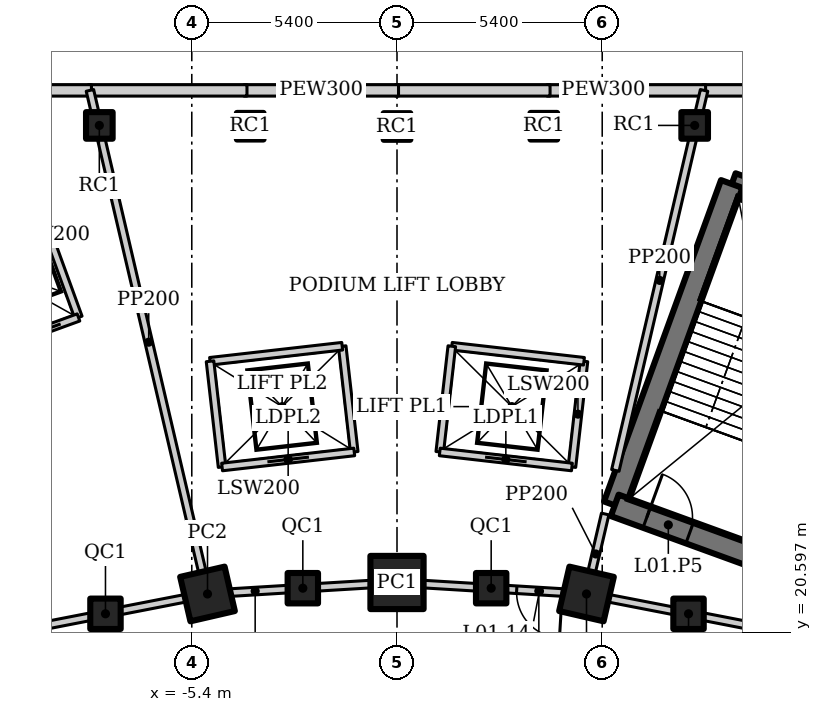
"""IFC4 building model, lengths in metres.
Left out: names, types, materials, properties, quantities, classifications, styles, units other than length and angle.
Written with IfcOpenShell. Run it as: python <this file> out.ifc"""

import sys

from ifc_helpers import new_model, si_unit, direction, frame, frame_2d, origin, origin_2d, place, context, subcontext, project, spatial, rectangle, hollow_rectangle, extrude, element, fill, save


model = new_model("IFC4")
c1 = context("Model", 3, precision=1e-05, world=origin(), true_north=direction((0.0, 1.0)))
c2 = subcontext(c1, "Body", "Model", "MODEL_VIEW")
j1 = project(units=[si_unit("LENGTHUNIT", "METRE"), si_unit("PLANEANGLEUNIT", "RADIAN")], contexts=[c1])
p1 = place(None, origin())
s1 = spatial("IfcSite", under=j1, at=p1, CompositionType="ELEMENT")
p2 = place(p1, origin())
s2 = spatial("IfcBuilding", under=s1, at=p2, CompositionType="ELEMENT")
p3 = place(p2, frame((0.0, 0.0, 6.5)))
s3 = spatial("IfcBuildingStorey", under=s2, at=p3, CompositionType="ELEMENT", Elevation=6.5)
p4 = place(p3, frame((4.986, 21.598, 0.0), z_axis=(0.0, 0.0, 1.0), x_axis=(0.224951054344, 0.974370064785, 0.0)))
e1 = element("IfcColumn", 1, at=p4, inside=s3, PredefinedType="COLUMN", context=c2, shape_type="SweptSolid", body=[
    extrude(hollow_rectangle(XDim=1.2, YDim=1.2, WallThickness=0.1, at=origin_2d()), origin(), (0.0, 0.0, 1.0), 8.0),
])
p5 = place(p3, frame((0.0, 21.9, 0.0), z_axis=(0.0, 0.0, 1.0), x_axis=(1.0, 0.0, 0.0)))
e2 = element("IfcColumn", 2, at=p5, inside=s3, PredefinedType="COLUMN", context=c2, shape_type="SweptSolid", body=[
    extrude(hollow_rectangle(XDim=1.4, YDim=1.4, WallThickness=0.1, at=origin_2d()), origin(), (0.0, 0.0, 1.0), 8.0),
])
p6 = place(p3, frame((-4.986, 21.598, 0.0), z_axis=(0.0, 0.0, 1.0), x_axis=(0.974370064785, 0.224951054344, 0.0)))
e3 = element("IfcColumn", 3, at=p6, inside=s3, PredefinedType="COLUMN", context=c2, shape_type="SweptSolid", body=[
    extrude(hollow_rectangle(XDim=1.2, YDim=1.2, WallThickness=0.1, at=origin_2d()), origin(), (0.0, 0.0, 1.0), 8.0),
])
for number, where, z_axis, x_axis in (
    (4, (7.671, 21.076, 0.0), (0.0, 0.0, 1.0), (1.0, 0.0, 0.0)),
    (5, (2.478, 21.75, 0.0), (0.0, 0.0, 1.0), (1.0, 0.0, 0.0)),
    (6, (-2.478, 21.75, 0.0), (0.0, 0.0, 1.0), (1.0, 0.0, 0.0)),
    (7, (-7.671, 21.076, 0.0), (0.0, 0.0, 1.0), (1.0, 0.0, 0.0)),
):
    element("IfcColumn", number, at=place(p3, frame(where, z_axis=z_axis, x_axis=x_axis)), inside=s3, PredefinedType="COLUMN", context=c2, shape_type="SweptSolid", body=[
        extrude(hollow_rectangle(XDim=0.8, YDim=0.8, WallThickness=0.05, at=origin_2d()), origin(), (0.0, 0.0, 1.0), 8.0),
    ])
for number, where, z_axis, x_axis in (
    (8, (3.863, 33.907, 0.0), (0.0, 0.0, 1.0), (1.0, 0.0, 0.0)),
    (9, (-3.863, 33.907, 0.0), (0.0, 0.0, 1.0), (1.0, 0.0, 0.0)),
    (10, (7.833, 33.928, 0.0), (0.0, 0.0, 1.0), (1.0, 0.0, 0.0)),
    (11, (0.0, 33.9, 0.0), (0.0, 0.0, 1.0), (1.0, 0.0, 0.0)),
    (12, (-7.833, 33.928, 0.0), (0.0, 0.0, 1.0), (1.0, 0.0, 0.0)),
):
    element("IfcColumn", number, at=place(p3, frame(where, z_axis=z_axis, x_axis=x_axis)), inside=s3, PredefinedType="COLUMN", context=c2, shape_type="SweptSolid", body=[
        extrude(hollow_rectangle(XDim=0.7, YDim=0.7, WallThickness=0.04, at=origin_2d()), origin(), (0.0, 0.0, 1.0), 8.0),
    ])
p7 = place(p3, frame((12.779, 34.85, 0.0), z_axis=(0.0, 0.0, 1.0), x_axis=(-1.0, 0.0, 0.0)))
e13 = element("IfcWall", 13, at=p7, inside=s3, PredefinedType="SOLIDWALL", context=c2, shape_type="SweptSolid", body=[
    extrude(rectangle(XDim=4.739, YDim=0.3, at=frame_2d((2.369, 0.0))), origin(), (0.0, 0.0, 1.0), 7.8),
])
p8 = place(p3, frame((8.12, 34.85, 0.0), z_axis=(0.0, 0.0, 1.0), x_axis=(-1.0, 0.0, 0.0)))
e14 = element("IfcWall", 14, at=p8, inside=s3, PredefinedType="SOLIDWALL", context=c2, shape_type="SweptSolid", body=[
    extrude(rectangle(XDim=4.173, YDim=0.3, at=frame_2d((2.086, 0.0))), origin(), (0.0, 0.0, 1.0), 7.8),
])
for number, where, z_axis, x_axis in (
    (15, (4.028, 34.85, 0.0), (0.0, 0.0, 1.0), (-1.0, 0.0, 0.0)),
    (16, (0.04, 34.85, 0.0), (0.0, 0.0, 1.0), (-1.0, 0.0, 0.0)),
):
    element("IfcWall", number, at=place(p3, frame(where, z_axis=z_axis, x_axis=x_axis)), inside=s3, PredefinedType="SOLIDWALL", context=c2, shape_type="SweptSolid", body=[
        extrude(rectangle(XDim=4.068, YDim=0.3, at=frame_2d((2.034, 0.0))), origin(), (0.0, 0.0, 1.0), 7.8),
    ])
p9 = place(p3, frame((-3.948, 34.85, 0.0), z_axis=(0.0, 0.0, 1.0), x_axis=(-1.0, 0.0, 0.0)))
e17 = element("IfcWall", 17, at=p9, inside=s3, PredefinedType="SOLIDWALL", context=c2, shape_type="SweptSolid", body=[
    extrude(rectangle(XDim=4.173, YDim=0.3, at=frame_2d((2.086, 0.0))), origin(), (0.0, 0.0, 1.0), 7.8),
])
p10 = place(p3, frame((-8.04, 34.85, 0.0), z_axis=(0.0, 0.0, 1.0), x_axis=(-1.0, 0.0, 0.0)))
e18 = element("IfcWall", 18, at=p10, inside=s3, PredefinedType="SOLIDWALL", context=c2, shape_type="SweptSolid", body=[
    extrude(rectangle(XDim=4.739, YDim=0.3, at=frame_2d((2.369, 0.0))), origin(), (0.0, 0.0, 1.0), 7.8),
])
p11 = place(p3, frame((10.463, 20.534, 0.0), z_axis=(0.0, 0.0, 1.0), x_axis=(-0.98163593748, 0.190763954266, 0.0)))
e19 = element("IfcWall", 19, at=p11, inside=s3, PredefinedType="SOLIDWALL", context=c2, shape_type="SweptSolid", body=[
    extrude(rectangle(XDim=2.844, YDim=0.2, at=frame_2d((1.422, 0.0))), origin(), (0.0, 0.0, 1.0), 7.396),
])
p12 = place(p3, frame((7.671, 21.076, 0.0), z_axis=(0.0, 0.0, 1.0), x_axis=(-0.981637218105, 0.190757364289, 0.0)))
e20 = element("IfcWall", 20, at=p12, inside=s3, PredefinedType="SOLIDWALL", context=c2, shape_type="SweptSolid", body=[
    extrude(rectangle(XDim=2.735, YDim=0.2, at=frame_2d((1.368, 0.0))), origin(), (0.0, 0.0, 1.0), 7.396),
])
p13 = place(p3, frame((4.986, 21.598, 0.0), z_axis=(0.0, 0.0, 1.0), x_axis=(-0.998172405641, 0.060430527186, 0.0)))
e21 = element("IfcWall", 21, at=p13, inside=s3, PredefinedType="SOLIDWALL", context=c2, shape_type="SweptSolid", body=[
    extrude(rectangle(XDim=2.513, YDim=0.2, at=frame_2d((1.256, 0.0))), origin(), (0.0, 0.0, 1.0), 7.396),
])
p14 = place(p13, frame((0.64, 0.0, 0.0)))
e22 = element("IfcOpeningElement", 22, at=p14, cuts=e21, PredefinedType="OPENING", context=c2, shape_type="SweptSolid", body=[
    extrude(rectangle(XDim=1.2, YDim=2.4, at=frame_2d((0.6, 1.2))), frame((0.0, 0.11, 0.0), z_axis=(0.0, -1.0, 0.0), x_axis=(1.0, 0.0, 0.0)), (0.0, 0.0, 1.0), 0.22),
])
p15 = place(p3, frame((2.478, 21.75, 0.0), z_axis=(0.0, 0.0, 1.0), x_axis=(-0.998175328335, 0.060382231685, 0.0)))
e23 = element("IfcWall", 23, at=p15, inside=s3, PredefinedType="SOLIDWALL", context=c2, shape_type="SweptSolid", body=[
    extrude(rectangle(XDim=2.483, YDim=0.2, at=frame_2d((1.241, 0.0))), origin(), (0.0, 0.0, 1.0), 7.343),
])
p16 = place(p3, frame((0.0, 21.9, 0.0), z_axis=(0.0, 0.0, 1.0), x_axis=(-0.998175328335, -0.060382231685, 0.0)))
e24 = element("IfcWall", 24, at=p16, inside=s3, PredefinedType="SOLIDWALL", context=c2, shape_type="SweptSolid", body=[
    extrude(rectangle(XDim=2.483, YDim=0.2, at=frame_2d((1.241, 0.0))), origin(), (0.0, 0.0, 1.0), 7.35),
])
p17 = place(p3, frame((-2.478, 21.75, 0.0), z_axis=(0.0, 0.0, 1.0), x_axis=(-0.998172405641, -0.060430527186, 0.0)))
e25 = element("IfcWall", 25, at=p17, inside=s3, PredefinedType="SOLIDWALL", context=c2, shape_type="SweptSolid", body=[
    extrude(rectangle(XDim=2.513, YDim=0.2, at=frame_2d((1.256, 0.0))), origin(), (0.0, 0.0, 1.0), 7.35),
])
p18 = place(p3, frame((-4.986, 21.598, 0.0), z_axis=(0.0, 0.0, 1.0), x_axis=(-0.981637218105, -0.190757364289, 0.0)))
e26 = element("IfcWall", 26, at=p18, inside=s3, PredefinedType="SOLIDWALL", context=c2, shape_type="SweptSolid", body=[
    extrude(rectangle(XDim=2.735, YDim=0.2, at=frame_2d((1.368, 0.0))), origin(), (0.0, 0.0, 1.0), 7.2),
])
p19 = place(p3, frame((-7.671, 21.076, 0.0), z_axis=(0.0, 0.0, 1.0), x_axis=(-0.98163593748, -0.190763954266, 0.0)))
e27 = element("IfcWall", 27, at=p19, inside=s3, PredefinedType="SOLIDWALL", context=c2, shape_type="SweptSolid", body=[
    extrude(rectangle(XDim=2.844, YDim=0.2, at=frame_2d((1.422, 0.0))), origin(), (0.0, 0.0, 1.0), 7.396),
])
p20 = place(p3, frame((4.986, 21.598, 0.0), z_axis=(0.0, 0.0, 1.0), x_axis=(0.227351065365, 0.973812863479, 0.0)))
e28 = element("IfcWall", 28, at=p20, inside=s3, PredefinedType="SOLIDWALL", context=c2, shape_type="SweptSolid", body=[
    extrude(rectangle(XDim=2.161, YDim=0.2, at=frame_2d((1.08, 0.0))), origin(), (0.0, 0.0, 1.0), 6.3),
])
p21 = place(p3, frame((5.745, 24.849, 0.0), z_axis=(0.0, 0.0, 1.0), x_axis=(0.227353607936, 0.973812269875, 0.0)))
e29 = element("IfcWall", 29, at=p21, inside=s3, PredefinedType="SOLIDWALL", context=c2, shape_type="SweptSolid", body=[
    extrude(rectangle(XDim=10.27, YDim=0.2, at=frame_2d((5.135, 0.0))), origin(), (0.0, 0.0, 1.0), 6.3),
])
p22 = place(p3, frame((-4.986, 21.598, 0.0), z_axis=(0.0, 0.0, 1.0), x_axis=(-0.227360055616, 0.973810764528, 0.0)))
e30 = element("IfcWall", 30, at=p22, inside=s3, PredefinedType="SOLIDWALL", context=c2, shape_type="SweptSolid", body=[
    extrude(rectangle(XDim=13.608, YDim=0.2, at=frame_2d((6.804, 0.0))), origin(), (0.0, 0.0, 1.0), 7.028),
])
p23 = place(p3, frame((14.07, 30.471, 0.0), z_axis=(0.0, 0.0, 1.0), x_axis=(-0.939692822968, 0.342019587834, 0.0)))
e31 = element("IfcWall", 31, at=p23, inside=s3, PredefinedType="SHEAR", context=c2, shape_type="SweptSolid", body=[
    extrude(rectangle(XDim=5.6, YDim=0.6, at=frame_2d((2.8, 0.0))), origin(), (0.0, 0.0, 1.0), 8.0),
])
p24 = place(p3, frame((8.808, 32.387, 0.0), z_axis=(0.0, 0.0, 1.0), x_axis=(-0.3420218461, -0.939692001025, 0.0)))
e32 = element("IfcWall", 32, at=p24, inside=s3, PredefinedType="SHEAR", context=c2, shape_type="SweptSolid", body=[
    extrude(rectangle(XDim=9.0, YDim=0.6, at=frame_2d((4.5, 0.0))), origin(), (0.0, 0.0, 1.0), 8.0),
])
p25 = place(p3, frame((5.73, 23.93, 0.0), z_axis=(0.0, 0.0, 1.0), x_axis=(0.939678810556, -0.342058084236, 0.0)))
e33 = element("IfcWall", 33, at=p25, inside=s3, PredefinedType="SHEAR", context=c2, shape_type="SweptSolid", body=[
    extrude(rectangle(XDim=5.6, YDim=0.6, at=frame_2d((2.8, 0.0))), origin(), (0.0, 0.0, 1.0), 8.0),
])
p26 = place(p25, frame((0.9, 0.0, 0.0)))
e34 = element("IfcOpeningElement", 34, at=p26, cuts=e33, PredefinedType="OPENING", context=c2, shape_type="SweptSolid", body=[
    extrude(rectangle(XDim=1.2, YDim=2.1, at=frame_2d((0.6, 1.05))), frame((0.0, 0.31, 0.0), z_axis=(0.0, -1.0, 0.0), x_axis=(1.0, 0.0, 0.0)), (0.0, 0.0, 1.0), 0.62),
])
p27 = place(p3, frame((4.603, 24.939, 0.0), z_axis=(0.0, 0.0, 1.0), x_axis=(0.113177712989, 0.993574760792, 0.0)))
e35 = element("IfcWall", 35, at=p27, inside=s3, PredefinedType="SOLIDWALL", context=c2, shape_type="SweptSolid", body=[
    extrude(rectangle(XDim=2.8, YDim=0.2, at=frame_2d((1.4, 0.0))), origin(), (0.0, 0.0, 1.0), 7.8),
])
p28 = place(p3, frame((4.92, 27.721, 0.0), z_axis=(0.0, 0.0, 1.0), x_axis=(-0.993571061716, 0.113210182053, 0.0)))
e36 = element("IfcWall", 36, at=p28, inside=s3, PredefinedType="SOLIDWALL", context=c2, shape_type="SweptSolid", body=[
    extrude(rectangle(XDim=3.5, YDim=0.2, at=frame_2d((1.75, 0.0))), origin(), (0.0, 0.0, 1.0), 6.3),
])
p29 = place(p3, frame((1.442, 28.117, 0.0), z_axis=(0.0, 0.0, 1.0), x_axis=(-0.113177712989, -0.993574760792, 0.0)))
e37 = element("IfcWall", 37, at=p29, inside=s3, PredefinedType="SOLIDWALL", context=c2, shape_type="SweptSolid", body=[
    extrude(rectangle(XDim=2.8, YDim=0.2, at=frame_2d((1.4, 0.0))), origin(), (0.0, 0.0, 1.0), 7.8),
])
p30 = place(p3, frame((1.125, 25.335, 0.0), z_axis=(0.0, 0.0, 1.0), x_axis=(0.993571061716, -0.113210182053, 0.0)))
e38 = element("IfcWall", 38, at=p30, inside=s3, PredefinedType="SOLIDWALL", context=c2, shape_type="SweptSolid", body=[
    extrude(rectangle(XDim=3.5, YDim=0.2, at=frame_2d((1.75, 0.0))), origin(), (0.0, 0.0, 1.0), 6.3),
])
p31 = place(p30, frame((1.2, 0.0, 0.0)))
e39 = element("IfcOpeningElement", 39, at=p31, cuts=e38, PredefinedType="OPENING", context=c2, shape_type="SweptSolid", body=[
    extrude(rectangle(XDim=1.1, YDim=2.2, at=frame_2d((0.55, 1.1))), frame((0.0, 0.11, 0.0), z_axis=(0.0, -1.0, 0.0), x_axis=(1.0, 0.0, 0.0)), (0.0, 0.0, 1.0), 0.22),
])
p32 = place(p3, frame((-1.125, 25.335, 0.0), z_axis=(0.0, 0.0, 1.0), x_axis=(-0.113177712989, 0.993574760792, 0.0)))
e40 = element("IfcWall", 40, at=p32, inside=s3, PredefinedType="SOLIDWALL", context=c2, shape_type="SweptSolid", body=[
    extrude(rectangle(XDim=2.8, YDim=0.2, at=frame_2d((1.4, 0.0))), origin(), (0.0, 0.0, 1.0), 7.8),
])
p33 = place(p3, frame((-1.442, 28.117, 0.0), z_axis=(0.0, 0.0, 1.0), x_axis=(-0.993571061716, -0.113210182053, 0.0)))
e41 = element("IfcWall", 41, at=p33, inside=s3, PredefinedType="SOLIDWALL", context=c2, shape_type="SweptSolid", body=[
    extrude(rectangle(XDim=3.5, YDim=0.2, at=frame_2d((1.75, 0.0))), origin(), (0.0, 0.0, 1.0), 7.8),
])
p34 = place(p3, frame((-4.92, 27.721, 0.0), z_axis=(0.0, 0.0, 1.0), x_axis=(0.113177712989, -0.993574760792, 0.0)))
e42 = element("IfcWall", 42, at=p34, inside=s3, PredefinedType="SOLIDWALL", context=c2, shape_type="SweptSolid", body=[
    extrude(rectangle(XDim=2.8, YDim=0.2, at=frame_2d((1.4, 0.0))), origin(), (0.0, 0.0, 1.0), 7.8),
])
p35 = place(p3, frame((-4.603, 24.939, 0.0), z_axis=(0.0, 0.0, 1.0), x_axis=(0.993571061716, 0.113210182053, 0.0)))
e43 = element("IfcWall", 43, at=p35, inside=s3, PredefinedType="SOLIDWALL", context=c2, shape_type="SweptSolid", body=[
    extrude(rectangle(XDim=3.5, YDim=0.2, at=frame_2d((1.75, 0.0))), origin(), (0.0, 0.0, 1.0), 7.8),
])
p36 = place(p35, frame((1.2, 0.0, 0.0)))
e44 = element("IfcOpeningElement", 44, at=p36, cuts=e43, PredefinedType="OPENING", context=c2, shape_type="SweptSolid", body=[
    extrude(rectangle(XDim=1.1, YDim=2.2, at=frame_2d((0.55, 1.1))), frame((0.0, 0.11, 0.0), z_axis=(0.0, -1.0, 0.0), x_axis=(1.0, 0.0, 0.0)), (0.0, 0.0, 1.0), 0.22),
])
p37 = place(p3, frame((-8.381, 28.875, 0.0), z_axis=(0.0, 0.0, 1.0), x_axis=(-0.342045591466, 0.93968335803, 0.0)))
e45 = element("IfcWall", 45, at=p37, inside=s3, PredefinedType="SOLIDWALL", context=c2, shape_type="SweptSolid", body=[
    extrude(rectangle(XDim=4.6, YDim=0.2, at=frame_2d((2.3, 0.0))), origin(), (0.0, 0.0, 1.0), 7.8),
])
p38 = place(p3, frame((-12.14, 27.507, 0.0), z_axis=(0.0, 0.0, 1.0), x_axis=(0.939706071622, 0.341983185197, 0.0)))
e46 = element("IfcWall", 46, at=p38, inside=s3, PredefinedType="SOLIDWALL", context=c2, shape_type="SweptSolid", body=[
    extrude(rectangle(XDim=4.0, YDim=0.2, at=frame_2d((2.0, 0.0))), origin(), (0.0, 0.0, 1.0), 7.8),
])
p39 = place(p38, frame((0.5, 0.0, 0.0)))
e47 = element("IfcOpeningElement", 47, at=p39, cuts=e46, PredefinedType="OPENING", context=c2, shape_type="SweptSolid", body=[
    extrude(rectangle(XDim=3.0, YDim=3.0, at=frame_2d((1.5, 1.5))), frame((0.0, 0.11, 0.0), z_axis=(0.0, -1.0, 0.0), x_axis=(1.0, 0.0, 0.0)), (0.0, 0.0, 1.0), 0.22),
])
p40 = place(p14, origin())
e48 = element("IfcDoor", 48, at=p40, inside=s3, OperationType="SINGLE_SWING_RIGHT", PredefinedType="DOOR", context=c2, shape_type="SweptSolid", body=[
    extrude(rectangle(XDim=1.2, YDim=2.4, at=frame_2d((0.6, 1.2))), frame((0.0, 0.025, 0.0), z_axis=(0.0, -1.0, 0.0), x_axis=(1.0, 0.0, 0.0)), (0.0, 0.0, 1.0), 0.05),
])
fill(e22, e48)
p41 = place(p26, origin())
e49 = element("IfcDoor", 49, at=p41, inside=s3, OperationType="SINGLE_SWING_RIGHT", PredefinedType="DOOR", context=c2, shape_type="SweptSolid", body=[
    extrude(rectangle(XDim=1.2, YDim=2.1, at=frame_2d((0.6, 1.05))), frame((0.0, 0.025, 0.0), z_axis=(0.0, -1.0, 0.0), x_axis=(1.0, 0.0, 0.0)), (0.0, 0.0, 1.0), 0.05),
])
fill(e34, e49)
p42 = place(p31, origin())
e50 = element("IfcDoor", 50, at=p42, inside=s3, OperationType="DOUBLE_DOOR_SLIDING", PredefinedType="DOOR", context=c2, shape_type="SweptSolid", body=[
    extrude(rectangle(XDim=1.1, YDim=2.2, at=frame_2d((0.55, 1.1))), frame((0.0, 0.025, 0.0), z_axis=(0.0, -1.0, 0.0), x_axis=(1.0, 0.0, 0.0)), (0.0, 0.0, 1.0), 0.05),
])
fill(e39, e50)
p43 = place(p36, origin())
e51 = element("IfcDoor", 51, at=p43, inside=s3, OperationType="DOUBLE_DOOR_SLIDING", PredefinedType="DOOR", context=c2, shape_type="SweptSolid", body=[
    extrude(rectangle(XDim=1.1, YDim=2.2, at=frame_2d((0.55, 1.1))), frame((0.0, 0.025, 0.0), z_axis=(0.0, -1.0, 0.0), x_axis=(1.0, 0.0, 0.0)), (0.0, 0.0, 1.0), 0.05),
])
fill(e44, e51)
p44 = place(p39, origin())
e52 = element("IfcDoor", 52, at=p44, inside=s3, OperationType="DOUBLE_DOOR_SLIDING", PredefinedType="DOOR", context=c2, shape_type="SweptSolid", body=[
    extrude(rectangle(XDim=3.0, YDim=3.0, at=frame_2d((1.5, 1.5))), frame((0.0, 0.025, 0.0), z_axis=(0.0, -1.0, 0.0), x_axis=(1.0, 0.0, 0.0)), (0.0, 0.0, 1.0), 0.05),
])
fill(e47, e52)
save(model, sys.argv[1])
